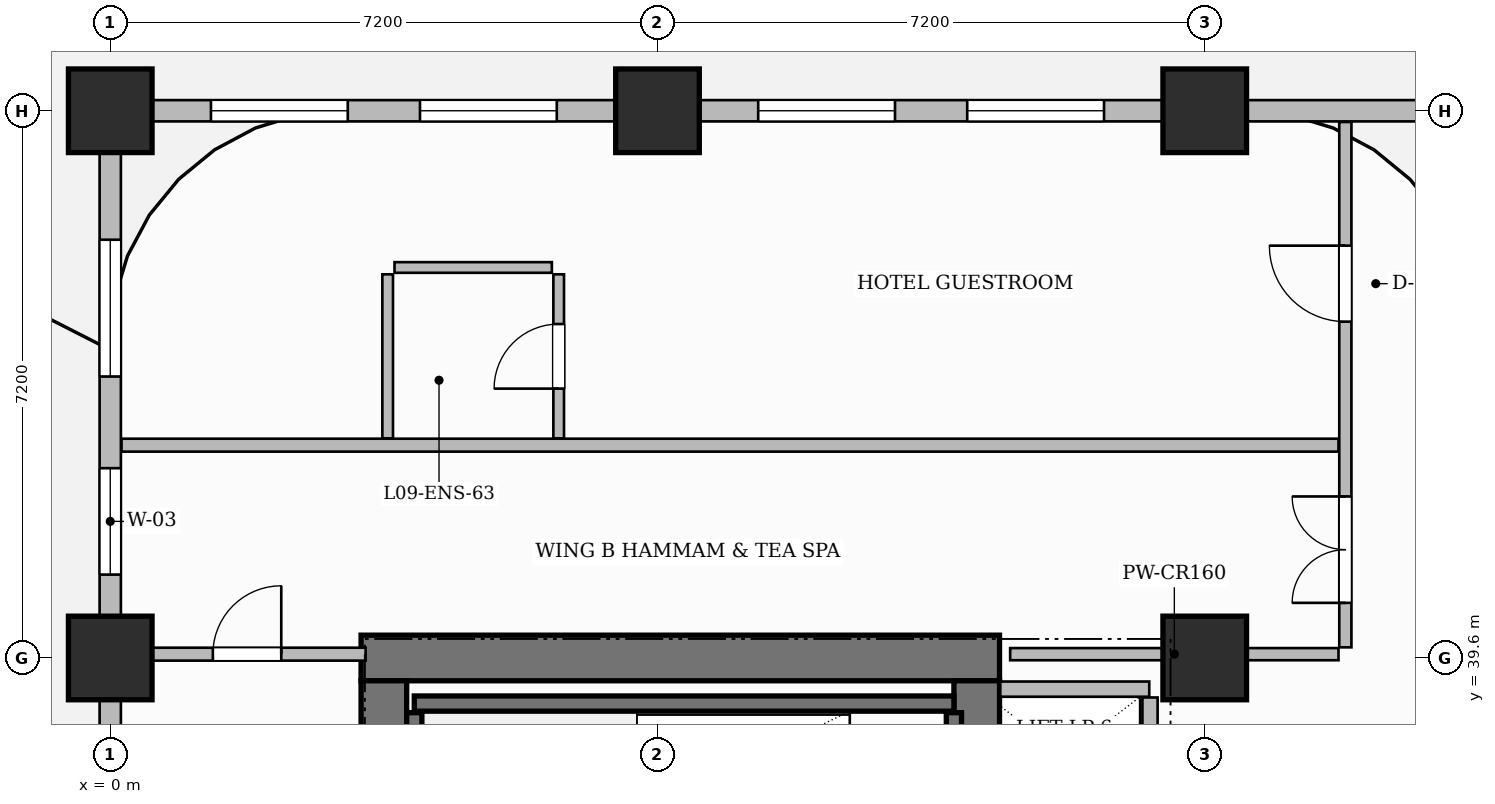
"""IFC4 building model, lengths in metres.
Left out: names, types, materials, properties, quantities, classifications, styles, units other than length and angle.
Written with IfcOpenShell. Run it as: python <this file> out.ifc"""

import sys

from ifc_helpers import new_model, si_unit, direction, frame, frame_2d, origin, origin_2d, place, context, subcontext, project, spatial, rectangle, extrude, source, transform, mapped, element, fill, save


model = new_model("IFC4")
c1 = context("Model", 3, precision=1e-05, world=origin(), true_north=direction((0.0, 1.0)))
c2 = subcontext(c1, "Body", "Model", "MODEL_VIEW")
j1 = project(units=[si_unit("LENGTHUNIT", "METRE"), si_unit("PLANEANGLEUNIT", "RADIAN")], contexts=[c1])
p1 = place(None, origin())
s1 = spatial("IfcSite", under=j1, at=p1, CompositionType="ELEMENT")
p2 = place(p1, origin())
s2 = spatial("IfcBuilding", under=s1, at=p2, CompositionType="ELEMENT")
p3 = place(p2, frame((0.0, 0.0, 43.5)))
s3 = spatial("IfcBuildingStorey", under=s2, at=p3, CompositionType="ELEMENT", Elevation=43.5)
p4 = place(p3, frame((3.3, 39.6, 0.0), z_axis=(0.0, 0.0, 1.0), x_axis=(1.0, 0.0, 0.0)))
e1 = element("IfcWall", 1, at=p4, inside=s3, PredefinedType="SHEAR", context=c2, shape_type="SweptSolid", body=[
    extrude(rectangle(XDim=8.4, YDim=0.6, at=frame_2d((4.2, 0.0))), origin(), (0.0, 0.0, 1.0), 3.7),
])
p5 = place(p3, frame((3.6, 25.5, 0.0), z_axis=(0.0, 0.0, 1.0), x_axis=(0.0, 1.0, 0.0)))
e2 = element("IfcWall", 2, at=p5, inside=s3, PredefinedType="SHEAR", context=c2, shape_type="SweptSolid", body=[
    extrude(rectangle(XDim=13.8, YDim=0.6, at=frame_2d((6.9, 0.0))), origin(), (0.0, 0.0, 1.0), 3.7),
])
p6 = place(p3, frame((11.4, 25.5, 0.0), z_axis=(0.0, 0.0, 1.0), x_axis=(0.0, 1.0, 0.0)))
e3 = element("IfcWall", 3, at=p6, inside=s3, PredefinedType="SHEAR", context=c2, shape_type="SweptSolid", body=[
    extrude(rectangle(XDim=13.8, YDim=0.6, at=frame_2d((6.9, 0.0))), origin(), (0.0, 0.0, 1.0), 3.7),
])
p7 = place(p6, frame((6.47, 0.0, 0.0)))
e4 = element("IfcOpeningElement", 4, at=p7, cuts=e3, PredefinedType="OPENING", context=c2, shape_type="SweptSolid", body=[
    extrude(rectangle(XDim=1.5, YDim=2.2, at=frame_2d((0.75, 1.1))), frame((0.0, 0.31, 0.0), z_axis=(0.0, -1.0, 0.0), x_axis=(1.0, 0.0, 0.0)), (0.0, 0.0, 1.0), 0.62),
])
m1 = source(origin(), c2, "Body", "SweptSolid", [
    extrude(rectangle(XDim=1.1, YDim=1.1, at=origin_2d()), origin(), (0.0, 0.0, 1.0), 3.7),
])
for number, where, z_axis, x_axis in (
    (5, (0.0, 39.6, 0.0), (0.0, 0.0, 1.0), (1.0, 0.0, 0.0)),
    (6, (0.0, 46.8, 0.0), (0.0, 0.0, 1.0), (1.0, 0.0, 0.0)),
    (7, (7.2, 46.8, 0.0), (0.0, 0.0, 1.0), (1.0, 0.0, 0.0)),
    (8, (14.4, 39.6, 0.0), (0.0, 0.0, 1.0), (1.0, 0.0, 0.0)),
    (9, (14.4, 46.8, 0.0), (0.0, 0.0, 1.0), (1.0, 0.0, 0.0)),
):
    element("IfcColumn", number, at=place(p3, frame(where, z_axis=z_axis, x_axis=x_axis)), inside=s3, PredefinedType="COLUMN", context=c2, shape_type="MappedRepresentation", body=[
        mapped(m1, transform((0.0, 0.0, 0.0), scale=1.0)),
    ])
p8 = place(p3, frame((4.0, 39.0, 0.0), z_axis=(0.0, 0.0, 1.0), x_axis=(1.0, 0.0, 0.0)))
e10 = element("IfcWall", 10, at=p8, inside=s3, PredefinedType="SHEAR", context=c2, shape_type="SweptSolid", body=[
    extrude(rectangle(XDim=7.1, YDim=0.2, at=frame_2d((3.55, 0.0))), origin(), (0.0, 0.0, 1.0), 3.7),
])
for number, where, z_axis, x_axis in (
    (11, (4.0, 36.18, 0.0), (0.0, 0.0, 1.0), (0.0, 1.0, 0.0)),
    (12, (11.1, 36.18, 0.0), (0.0, 0.0, 1.0), (0.0, 1.0, 0.0)),
):
    element("IfcWall", number, at=place(p3, frame(where, z_axis=z_axis, x_axis=x_axis)), inside=s3, PredefinedType="SHEAR", context=c2, shape_type="SweptSolid", body=[
        extrude(rectangle(XDim=2.7, YDim=0.2, at=frame_2d((1.35, 0.0))), origin(), (0.0, 0.0, 1.0), 3.7),
    ])
p9 = place(p3, frame((11.71, 39.19, 0.0), z_axis=(0.0, 0.0, 1.0), x_axis=(1.0, 0.0, 0.0)))
e13 = element("IfcWall", 13, at=p9, inside=s3, PredefinedType="PARTITIONING", context=c2, shape_type="SweptSolid", body=[
    extrude(rectangle(XDim=1.96, YDim=0.2, at=frame_2d((0.98, 0.0))), origin(), (0.0, 0.0, 1.0), 3.45),
])
p10 = place(p3, frame((13.68, 34.36, 0.0), z_axis=(0.0, 0.0, 1.0), x_axis=(0.0, 1.0, 0.0)))
e14 = element("IfcWall", 14, at=p10, inside=s3, PredefinedType="PARTITIONING", context=c2, shape_type="SweptSolid", body=[
    extrude(rectangle(XDim=4.72, YDim=0.2, at=frame_2d((2.36, 0.0))), origin(), (0.0, 0.0, 1.0), 3.45),
])
p11 = place(p3, frame((16.25, 39.74, 0.0), z_axis=(0.0, 0.0, 1.0), x_axis=(0.0, 1.0, 0.0)))
e15 = element("IfcWall", 15, at=p11, inside=s3, PredefinedType="PARTITIONING", context=c2, shape_type="SweptSolid", body=[
    extrude(rectangle(XDim=6.912, YDim=0.16, at=frame_2d((3.456, 0.0))), origin(), (0.0, 0.0, 1.0), 3.45),
])
p12 = place(p11, frame((0.585, 0.0, 0.0)))
e16 = element("IfcOpeningElement", 16, at=p12, cuts=e15, PredefinedType="OPENING", context=c2, shape_type="SweptSolid", body=[
    extrude(rectangle(XDim=1.4, YDim=2.35, at=frame_2d((0.7, 1.175))), frame((0.0, 0.09, 0.0), z_axis=(0.0, -1.0, 0.0), x_axis=(1.0, 0.0, 0.0)), (0.0, 0.0, 1.0), 0.18),
])
p13 = place(p11, frame((4.285, 0.0, 0.0)))
e17 = element("IfcOpeningElement", 17, at=p13, cuts=e15, PredefinedType="OPENING", context=c2, shape_type="SweptSolid", body=[
    extrude(rectangle(XDim=1.0, YDim=2.2, at=frame_2d((0.5, 1.1))), frame((0.0, 0.09, 0.0), z_axis=(0.0, -1.0, 0.0), x_axis=(1.0, 0.0, 0.0)), (0.0, 0.0, 1.0), 0.18),
])
p14 = place(p3, frame((11.84, 39.65, 0.0), z_axis=(0.0, 0.0, 1.0), x_axis=(1.0, 0.0, 0.0)))
e18 = element("IfcWall", 18, at=p14, inside=s3, PredefinedType="PARTITIONING", context=c2, shape_type="SweptSolid", body=[
    extrude(rectangle(XDim=4.32, YDim=0.16, at=frame_2d((2.16, 0.0))), origin(), (0.0, 0.0, 1.0), 2.885),
])
p15 = place(p3, frame((0.24, 39.65, 0.0), z_axis=(0.0, 0.0, 1.0), x_axis=(1.0, 0.0, 0.0)))
e19 = element("IfcWall", 19, at=p15, inside=s3, PredefinedType="PARTITIONING", context=c2, shape_type="SweptSolid", body=[
    extrude(rectangle(XDim=3.12, YDim=0.17, at=frame_2d((1.56, 0.0))), origin(), (0.0, 0.0, 1.0), 3.45),
])
p16 = place(p15, frame((1.11, 0.0, 0.0)))
e20 = element("IfcOpeningElement", 20, at=p16, cuts=e19, PredefinedType="OPENING", context=c2, shape_type="SweptSolid", body=[
    extrude(rectangle(XDim=0.9, YDim=2.15, at=frame_2d((0.45, 1.075))), frame((0.0, 0.095, 0.0), z_axis=(0.0, -1.0, 0.0), x_axis=(1.0, 0.0, 0.0)), (0.0, 0.0, 1.0), 0.19),
])
p17 = place(p3, frame((0.148, 42.4, 0.0), z_axis=(0.0, 0.0, 1.0), x_axis=(1.0, 0.0, 0.0)))
e21 = element("IfcWall", 21, at=p17, inside=s3, PredefinedType="PARTITIONING", context=c2, shape_type="SweptSolid", body=[
    extrude(rectangle(XDim=16.012, YDim=0.17, at=frame_2d((8.006, 0.0))), origin(), (0.0, 0.0, 1.0), 3.45),
])
p18 = place(p3, frame((3.65, 42.49, 0.0), z_axis=(0.0, 0.0, 1.0), x_axis=(0.0, 1.0, 0.0)))
e22 = element("IfcWall", 22, at=p18, inside=s3, PredefinedType="PARTITIONING", context=c2, shape_type="SweptSolid", body=[
    extrude(rectangle(XDim=2.158, YDim=0.14, at=frame_2d((1.079, 0.0))), origin(), (0.0, 0.0, 1.0), 3.45),
])
p19 = place(p3, frame((3.74, 44.738, 0.0), z_axis=(0.0, 0.0, 1.0), x_axis=(1.0, 0.0, 0.0)))
e23 = element("IfcWall", 23, at=p19, inside=s3, PredefinedType="PARTITIONING", context=c2, shape_type="SweptSolid", body=[
    extrude(rectangle(XDim=2.07, YDim=0.14, at=frame_2d((1.035, 0.0))), origin(), (0.0, 0.0, 1.0), 3.45),
])
p20 = place(p3, frame((5.9, 42.49, 0.0), z_axis=(0.0, 0.0, 1.0), x_axis=(0.0, 1.0, 0.0)))
e24 = element("IfcWall", 24, at=p20, inside=s3, PredefinedType="PARTITIONING", context=c2, shape_type="SweptSolid", body=[
    extrude(rectangle(XDim=2.158, YDim=0.14, at=frame_2d((1.079, 0.0))), origin(), (0.0, 0.0, 1.0), 3.45),
])
p21 = place(p20, frame((0.654, 0.0, 0.0)))
e25 = element("IfcOpeningElement", 25, at=p21, cuts=e24, PredefinedType="OPENING", context=c2, shape_type="SweptSolid", body=[
    extrude(rectangle(XDim=0.85, YDim=2.1, at=frame_2d((0.425, 1.05))), frame((0.0, 0.08, 0.0), z_axis=(0.0, -1.0, 0.0), x_axis=(1.0, 0.0, 0.0)), (0.0, 0.0, 1.0), 0.16),
])
p22 = place(p3, frame((0.0, 46.8, 0.0), z_axis=(0.0, 0.0, 1.0), x_axis=(1.0, 0.0, 0.0)))
e26 = element("IfcWall", 26, at=p22, inside=s3, PredefinedType="SOLIDWALL", context=c2, shape_type="SweptSolid", body=[
    extrude(rectangle(XDim=18.0, YDim=0.28, at=frame_2d((9.0, 0.0))), origin(), (0.0, 0.0, 1.0), 2.885),
])
p23 = place(p22, frame((1.325, 0.0, 0.8)))
e27 = element("IfcOpeningElement", 27, at=p23, cuts=e26, PredefinedType="OPENING", context=c2, shape_type="SweptSolid", body=[
    extrude(rectangle(XDim=1.8, YDim=1.85, at=frame_2d((0.9, 0.925))), frame((0.0, 0.15, 0.0), z_axis=(0.0, -1.0, 0.0), x_axis=(1.0, 0.0, 0.0)), (0.0, 0.0, 1.0), 0.3),
])
p24 = place(p22, frame((4.075, 0.0, 0.8)))
e28 = element("IfcOpeningElement", 28, at=p24, cuts=e26, PredefinedType="OPENING", context=c2, shape_type="SweptSolid", body=[
    extrude(rectangle(XDim=1.8, YDim=1.85, at=frame_2d((0.9, 0.925))), frame((0.0, 0.15, 0.0), z_axis=(0.0, -1.0, 0.0), x_axis=(1.0, 0.0, 0.0)), (0.0, 0.0, 1.0), 0.3),
])
p25 = place(p22, frame((8.525, 0.0, 0.8)))
e29 = element("IfcOpeningElement", 29, at=p25, cuts=e26, PredefinedType="OPENING", context=c2, shape_type="SweptSolid", body=[
    extrude(rectangle(XDim=1.8, YDim=1.85, at=frame_2d((0.9, 0.925))), frame((0.0, 0.15, 0.0), z_axis=(0.0, -1.0, 0.0), x_axis=(1.0, 0.0, 0.0)), (0.0, 0.0, 1.0), 0.3),
])
p26 = place(p22, frame((11.275, 0.0, 0.8)))
e30 = element("IfcOpeningElement", 30, at=p26, cuts=e26, PredefinedType="OPENING", context=c2, shape_type="SweptSolid", body=[
    extrude(rectangle(XDim=1.8, YDim=1.85, at=frame_2d((0.9, 0.925))), frame((0.0, 0.15, 0.0), z_axis=(0.0, -1.0, 0.0), x_axis=(1.0, 0.0, 0.0)), (0.0, 0.0, 1.0), 0.3),
])
p27 = place(p3, frame((0.0, 25.25, 0.0), z_axis=(0.0, 0.0, 1.0), x_axis=(0.0, 1.0, 0.0)))
e31 = element("IfcWall", 31, at=p27, inside=s3, PredefinedType="SOLIDWALL", context=c2, shape_type="SweptSolid", body=[
    extrude(rectangle(XDim=21.5, YDim=0.28, at=frame_2d((10.75, 0.0))), origin(), (0.0, 0.0, 1.0), 2.885),
])
p28 = place(p27, frame((1.275, 0.0, 0.8)))
e32 = element("IfcOpeningElement", 32, at=p28, cuts=e31, PredefinedType="OPENING", context=c2, shape_type="SweptSolid", body=[
    extrude(rectangle(XDim=1.8, YDim=1.85, at=frame_2d((0.9, 0.925))), frame((0.0, 0.15, 0.0), z_axis=(0.0, -1.0, 0.0), x_axis=(1.0, 0.0, 0.0)), (0.0, 0.0, 1.0), 0.3),
])
p29 = place(p27, frame((4.025, 0.0, 0.8)))
e33 = element("IfcOpeningElement", 33, at=p29, cuts=e31, PredefinedType="OPENING", context=c2, shape_type="SweptSolid", body=[
    extrude(rectangle(XDim=1.8, YDim=1.85, at=frame_2d((0.9, 0.925))), frame((0.0, 0.15, 0.0), z_axis=(0.0, -1.0, 0.0), x_axis=(1.0, 0.0, 0.0)), (0.0, 0.0, 1.0), 0.3),
])
p30 = place(p27, frame((8.475, 0.0, 0.8)))
e34 = element("IfcOpeningElement", 34, at=p30, cuts=e31, PredefinedType="OPENING", context=c2, shape_type="SweptSolid", body=[
    extrude(rectangle(XDim=1.8, YDim=1.85, at=frame_2d((0.9, 0.925))), frame((0.0, 0.15, 0.0), z_axis=(0.0, -1.0, 0.0), x_axis=(1.0, 0.0, 0.0)), (0.0, 0.0, 1.0), 0.3),
])
p31 = place(p27, frame((11.225, 0.0, 0.8)))
e35 = element("IfcOpeningElement", 35, at=p31, cuts=e31, PredefinedType="OPENING", context=c2, shape_type="SweptSolid", body=[
    extrude(rectangle(XDim=1.8, YDim=1.85, at=frame_2d((0.9, 0.925))), frame((0.0, 0.15, 0.0), z_axis=(0.0, -1.0, 0.0), x_axis=(1.0, 0.0, 0.0)), (0.0, 0.0, 1.0), 0.3),
])
p32 = place(p27, frame((15.447, 0.0, 0.8)))
e36 = element("IfcOpeningElement", 36, at=p32, cuts=e31, PredefinedType="OPENING", context=c2, shape_type="SweptSolid", body=[
    extrude(rectangle(XDim=1.4, YDim=1.85, at=frame_2d((0.7, 0.925))), frame((0.0, 0.15, 0.0), z_axis=(0.0, -1.0, 0.0), x_axis=(1.0, 0.0, 0.0)), (0.0, 0.0, 1.0), 0.3),
])
p33 = place(p27, frame((18.053, 0.0, 0.8)))
e37 = element("IfcOpeningElement", 37, at=p33, cuts=e31, PredefinedType="OPENING", context=c2, shape_type="SweptSolid", body=[
    extrude(rectangle(XDim=1.8, YDim=1.85, at=frame_2d((0.9, 0.925))), frame((0.0, 0.15, 0.0), z_axis=(0.0, -1.0, 0.0), x_axis=(1.0, 0.0, 0.0)), (0.0, 0.0, 1.0), 0.3),
])
m2 = source(origin(), c2, "Body", "SweptSolid", [
    extrude(rectangle(XDim=0.9, YDim=2.15, at=frame_2d((0.45, 1.075))), frame((0.0, 0.025, 0.0), z_axis=(0.0, -1.0, 0.0), x_axis=(1.0, 0.0, 0.0)), (0.0, 0.0, 1.0), 0.05),
])
p34 = place(p16, origin())
e38 = element("IfcDoor", 38, at=p34, inside=s3, OperationType="SINGLE_SWING_RIGHT", PredefinedType="DOOR", context=c2, shape_type="MappedRepresentation", body=[
    mapped(m2, transform((0.0, 0.0, 0.0), scale=1.0)),
])
fill(e20, e38)
m3 = source(origin(), c2, "Body", "SweptSolid", [
    extrude(rectangle(XDim=1.4, YDim=2.35, at=frame_2d((0.7, 1.175))), frame((0.0, 0.025, 0.0), z_axis=(0.0, -1.0, 0.0), x_axis=(1.0, 0.0, 0.0)), (0.0, 0.0, 1.0), 0.05),
])
p35 = place(p12, origin())
e39 = element("IfcDoor", 39, at=p35, inside=s3, OperationType="DOUBLE_DOOR_SINGLE_SWING", PredefinedType="DOOR", context=c2, shape_type="MappedRepresentation", body=[
    mapped(m3, transform((0.0, 0.0, 0.0), scale=1.0)),
])
fill(e16, e39)
m4 = source(origin(), c2, "Body", "SweptSolid", [
    extrude(rectangle(XDim=0.85, YDim=2.1, at=frame_2d((0.425, 1.05))), frame((0.0, 0.025, 0.0), z_axis=(0.0, -1.0, 0.0), x_axis=(1.0, 0.0, 0.0)), (0.0, 0.0, 1.0), 0.05),
])
p36 = place(p21, origin())
e40 = element("IfcDoor", 40, at=p36, inside=s3, OperationType="SINGLE_SWING_LEFT", PredefinedType="DOOR", context=c2, shape_type="MappedRepresentation", body=[
    mapped(m4, transform((0.0, 0.0, 0.0), scale=1.0)),
])
fill(e25, e40)
m5 = source(origin(), c2, "Body", "SweptSolid", [
    extrude(rectangle(XDim=1.0, YDim=2.2, at=frame_2d((0.5, 1.1))), frame((0.0, 0.025, 0.0), z_axis=(0.0, -1.0, 0.0), x_axis=(1.0, 0.0, 0.0)), (0.0, 0.0, 1.0), 0.05),
])
p37 = place(p13, origin())
e41 = element("IfcDoor", 41, at=p37, inside=s3, OperationType="SINGLE_SWING_RIGHT", PredefinedType="DOOR", context=c2, shape_type="MappedRepresentation", body=[
    mapped(m5, transform((0.0, 0.0, 0.0), scale=1.0)),
])
fill(e17, e41)
m6 = source(origin(), c2, "Body", "SweptSolid", [
    extrude(rectangle(XDim=1.8, YDim=1.85, at=frame_2d((0.9, 0.925))), frame((0.0, 0.03, 0.0), z_axis=(0.0, -1.0, 0.0), x_axis=(1.0, 0.0, 0.0)), (0.0, 0.0, 1.0), 0.06),
])
p38 = place(p23, origin())
e42 = element("IfcWindow", 42, at=p38, inside=s3, PartitioningType="DOUBLE_PANEL_VERTICAL", PredefinedType="WINDOW", context=c2, shape_type="MappedRepresentation", body=[
    mapped(m6, transform((0.0, 0.0, 0.0), scale=1.0)),
])
fill(e27, e42)
p39 = place(p24, origin())
e43 = element("IfcWindow", 43, at=p39, inside=s3, PartitioningType="DOUBLE_PANEL_VERTICAL", PredefinedType="WINDOW", context=c2, shape_type="MappedRepresentation", body=[
    mapped(m6, transform((0.0, 0.0, 0.0), scale=1.0)),
])
fill(e28, e43)
p40 = place(p25, origin())
e44 = element("IfcWindow", 44, at=p40, inside=s3, PartitioningType="DOUBLE_PANEL_VERTICAL", PredefinedType="WINDOW", context=c2, shape_type="MappedRepresentation", body=[
    mapped(m6, transform((0.0, 0.0, 0.0), scale=1.0)),
])
fill(e29, e44)
p41 = place(p26, origin())
e45 = element("IfcWindow", 45, at=p41, inside=s3, PartitioningType="DOUBLE_PANEL_VERTICAL", PredefinedType="WINDOW", context=c2, shape_type="MappedRepresentation", body=[
    mapped(m6, transform((0.0, 0.0, 0.0), scale=1.0)),
])
fill(e30, e45)
m7 = source(origin(), c2, "Body", "SweptSolid", [
    extrude(rectangle(XDim=1.4, YDim=1.85, at=frame_2d((0.7, 0.925))), frame((0.0, 0.03, 0.0), z_axis=(0.0, -1.0, 0.0), x_axis=(1.0, 0.0, 0.0)), (0.0, 0.0, 1.0), 0.06),
])
p42 = place(p32, origin())
e46 = element("IfcWindow", 46, at=p42, inside=s3, PartitioningType="SINGLE_PANEL", PredefinedType="WINDOW", context=c2, shape_type="MappedRepresentation", body=[
    mapped(m7, transform((0.0, 0.0, 0.0), scale=1.0)),
])
fill(e36, e46)
p43 = place(p33, origin())
e47 = element("IfcWindow", 47, at=p43, inside=s3, PartitioningType="DOUBLE_PANEL_VERTICAL", PredefinedType="WINDOW", context=c2, shape_type="MappedRepresentation", body=[
    mapped(m6, transform((0.0, 0.0, 0.0), scale=1.0)),
])
fill(e37, e47)
save(model, sys.argv[1])
